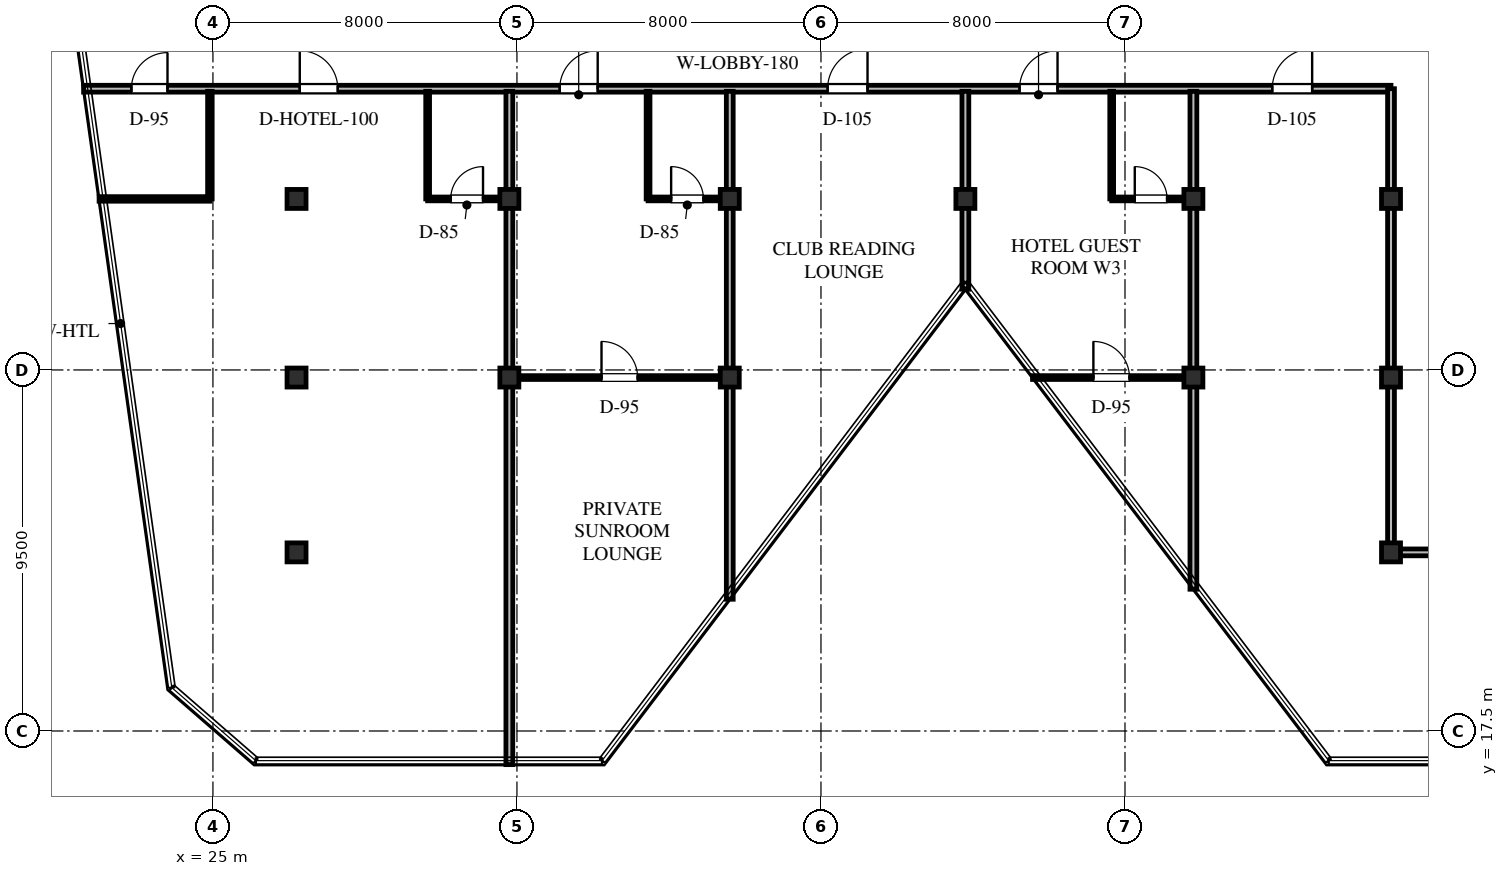
"""IFC4 building model, lengths in metres.
Left out: names, types, materials, properties, quantities, classifications, styles, units other than length and angle.
Written with IfcOpenShell. Run it as: python <this file> out.ifc"""

import sys

from ifc_helpers import new_model, si_unit, direction, frame, frame_2d, origin, origin_2d, place, context, subcontext, project, spatial, rectangle, hollow_rectangle, extrude, element, fill, save


model = new_model("IFC4")
c1 = context("Model", 3, precision=1e-05, world=origin(), true_north=direction((0.0, 1.0)))
c2 = subcontext(c1, "Body", "Model", "MODEL_VIEW")
j1 = project(units=[si_unit("LENGTHUNIT", "METRE"), si_unit("PLANEANGLEUNIT", "RADIAN")], contexts=[c1])
p1 = place(None, origin())
s1 = spatial("IfcSite", under=j1, at=p1, CompositionType="ELEMENT")
p2 = place(p1, origin())
s2 = spatial("IfcBuilding", under=s1, at=p2, CompositionType="ELEMENT")
p3 = place(p2, frame((0.0, 0.0, 241.8)))
s3 = spatial("IfcBuildingStorey", under=s2, at=p3, CompositionType="ELEMENT", Elevation=241.8)
for number, where, z_axis, x_axis in (
    (1, (44.8, 31.5, 0.0), (0.0, 0.0, 1.0), (1.0, 0.0, 0.0)),
    (2, (50.8, 31.5, 0.0), (0.0, 0.0, 1.0), (1.0, 0.0, 0.0)),
    (3, (56.0, 31.5, 0.0), (0.0, 0.0, 1.0), (1.0, 0.0, 0.0)),
    (4, (38.6, 31.5, 0.0), (0.0, 0.0, 1.0), (1.0, 0.0, 0.0)),
    (5, (32.8, 31.5, 0.0), (0.0, 0.0, 1.0), (1.0, 0.0, 0.0)),
    (6, (27.2, 31.5, 0.0), (0.0, 0.0, 1.0), (1.0, 0.0, 0.0)),
    (7, (38.6, 26.8, 0.0), (0.0, 0.0, 1.0), (1.0, 0.0, 0.0)),
    (8, (50.8, 26.8, 0.0), (0.0, 0.0, 1.0), (1.0, 0.0, 0.0)),
    (9, (56.0, 26.8, 0.0), (0.0, 0.0, 1.0), (1.0, 0.0, 0.0)),
    (10, (56.0, 22.2, 0.0), (0.0, 0.0, 1.0), (1.0, 0.0, 0.0)),
    (11, (27.2, 22.2, 0.0), (0.0, 0.0, 1.0), (1.0, 0.0, 0.0)),
    (12, (27.2, 26.8, 0.0), (0.0, 0.0, 1.0), (1.0, 0.0, 0.0)),
    (13, (32.8, 26.8, 0.0), (0.0, 0.0, 1.0), (1.0, 0.0, 0.0)),
):
    element("IfcColumn", number, at=place(p3, frame(where, z_axis=z_axis, x_axis=x_axis)), inside=s3, PredefinedType="COLUMN", context=c2, shape_type="SweptSolid", body=[
        extrude(hollow_rectangle(XDim=0.5, YDim=0.5, WallThickness=0.02, at=origin_2d()), origin(), (0.0, 0.0, 1.0), 3.6),
    ])
p4 = place(p3, frame((21.597, 34.4, 0.0), z_axis=(0.0, 0.0, 1.0), x_axis=(1.0, 0.0, 0.0)))
e14 = element("IfcWall", 14, at=p4, inside=s3, PredefinedType="STANDARD", context=c2, shape_type="SweptSolid", body=[
    extrude(rectangle(XDim=34.403, YDim=0.18, at=frame_2d((17.202, 0.0))), origin(), (0.0, 0.0, 1.0), 2.654),
])
p5 = place(p4, frame((1.258, 0.0, 0.0)))
e15 = element("IfcOpeningElement", 15, at=p5, cuts=e14, PredefinedType="OPENING", context=c2, shape_type="SweptSolid", body=[
    extrude(rectangle(XDim=0.95, YDim=2.15, at=frame_2d((0.475, 1.075))), frame((0.0, 0.1, 0.0), z_axis=(0.0, -1.0, 0.0), x_axis=(1.0, 0.0, 0.0)), (0.0, 0.0, 1.0), 0.2),
])
p6 = place(p4, frame((5.688, 0.0, 0.0)))
e16 = element("IfcOpeningElement", 16, at=p6, cuts=e14, PredefinedType="OPENING", context=c2, shape_type="SweptSolid", body=[
    extrude(rectangle(XDim=1.0, YDim=2.15, at=frame_2d((0.5, 1.075))), frame((0.0, 0.1, 0.0), z_axis=(0.0, -1.0, 0.0), x_axis=(1.0, 0.0, 0.0)), (0.0, 0.0, 1.0), 0.2),
])
p7 = place(p4, frame((12.528, 0.0, 0.0)))
e17 = element("IfcOpeningElement", 17, at=p7, cuts=e14, PredefinedType="OPENING", context=c2, shape_type="SweptSolid", body=[
    extrude(rectangle(XDim=1.0, YDim=2.15, at=frame_2d((0.5, 1.075))), frame((0.0, 0.1, 0.0), z_axis=(0.0, -1.0, 0.0), x_axis=(1.0, 0.0, 0.0)), (0.0, 0.0, 1.0), 0.2),
])
p8 = place(p4, frame((19.578, 0.0, 0.0)))
e18 = element("IfcOpeningElement", 18, at=p8, cuts=e14, PredefinedType="OPENING", context=c2, shape_type="SweptSolid", body=[
    extrude(rectangle(XDim=1.05, YDim=2.2, at=frame_2d((0.525, 1.1))), frame((0.0, 0.1, 0.0), z_axis=(0.0, -1.0, 0.0), x_axis=(1.0, 0.0, 0.0)), (0.0, 0.0, 1.0), 0.2),
])
p9 = place(p4, frame((24.628, 0.0, 0.0)))
e19 = element("IfcOpeningElement", 19, at=p9, cuts=e14, PredefinedType="OPENING", context=c2, shape_type="SweptSolid", body=[
    extrude(rectangle(XDim=1.0, YDim=2.15, at=frame_2d((0.5, 1.075))), frame((0.0, 0.1, 0.0), z_axis=(0.0, -1.0, 0.0), x_axis=(1.0, 0.0, 0.0)), (0.0, 0.0, 1.0), 0.2),
])
p10 = place(p4, frame((31.278, 0.0, 0.0)))
e20 = element("IfcOpeningElement", 20, at=p10, cuts=e14, PredefinedType="OPENING", context=c2, shape_type="SweptSolid", body=[
    extrude(rectangle(XDim=1.05, YDim=2.2, at=frame_2d((0.525, 1.1))), frame((0.0, 0.1, 0.0), z_axis=(0.0, -1.0, 0.0), x_axis=(1.0, 0.0, 0.0)), (0.0, 0.0, 1.0), 0.2),
])
p11 = place(p3, frame((56.0, 22.2, 0.0), z_axis=(0.0, 0.0, 1.0), x_axis=(0.0, 1.0, 0.0)))
e21 = element("IfcWall", 21, at=p11, inside=s3, PredefinedType="STANDARD", context=c2, shape_type="SweptSolid", body=[
    extrude(rectangle(XDim=12.2, YDim=0.18, at=frame_2d((6.1, 0.0))), origin(), (0.0, 0.0, 1.0), 2.654),
])
p12 = place(p3, frame((56.0, 22.2, 0.0), z_axis=(0.0, 0.0, 1.0), x_axis=(1.0, 0.0, 0.0)))
e22 = element("IfcWall", 22, at=p12, inside=s3, PredefinedType="STANDARD", context=c2, shape_type="SweptSolid", body=[
    extrude(rectangle(XDim=2.0, YDim=0.18, at=frame_2d((1.0, 0.0))), origin(), (0.0, 0.0, 1.0), 2.654),
])
p13 = place(p3, frame((24.92, 31.5, 0.0), z_axis=(0.0, 0.0, 1.0), x_axis=(0.0, 1.0, 0.0)))
e23 = element("IfcWall", 23, at=p13, inside=s3, PredefinedType="PARTITIONING", context=c2, shape_type="SweptSolid", body=[
    extrude(rectangle(XDim=2.832, YDim=0.12, at=frame_2d((1.416, 0.0))), origin(), (0.0, 0.0, 1.0), 3.35),
])
p14 = place(p3, frame((22.004, 31.5, 0.0), z_axis=(0.0, 0.0, 1.0), x_axis=(1.0, 0.0, 0.0)))
e24 = element("IfcWall", 24, at=p14, inside=s3, PredefinedType="PARTITIONING", context=c2, shape_type="SweptSolid", body=[
    extrude(rectangle(XDim=2.916, YDim=0.12, at=frame_2d((1.458, 0.0))), origin(), (0.0, 0.0, 1.0), 3.35),
])
p15 = place(p3, frame((30.65, 31.5, 0.0), z_axis=(0.0, 0.0, 1.0), x_axis=(0.0, 1.0, 0.0)))
e25 = element("IfcWall", 25, at=p15, inside=s3, PredefinedType="PARTITIONING", context=c2, shape_type="SweptSolid", body=[
    extrude(rectangle(XDim=2.832, YDim=0.1, at=frame_2d((1.416, 0.0))), origin(), (0.0, 0.0, 1.0), 2.654),
])
p16 = place(p3, frame((30.65, 31.5, 0.0), z_axis=(0.0, 0.0, 1.0), x_axis=(1.0, 0.0, 0.0)))
e26 = element("IfcWall", 26, at=p16, inside=s3, PredefinedType="PARTITIONING", context=c2, shape_type="SweptSolid", body=[
    extrude(rectangle(XDim=2.082, YDim=0.1, at=frame_2d((1.041, 0.0))), origin(), (0.0, 0.0, 1.0), 2.654),
])
p17 = place(p16, frame((0.607, 0.0, 0.0)))
e27 = element("IfcOpeningElement", 27, at=p17, cuts=e26, PredefinedType="OPENING", context=c2, shape_type="SweptSolid", body=[
    extrude(rectangle(XDim=0.85, YDim=2.1, at=frame_2d((0.425, 1.05))), frame((0.0, 0.06, 0.0), z_axis=(0.0, -1.0, 0.0), x_axis=(1.0, 0.0, 0.0)), (0.0, 0.0, 1.0), 0.12),
])
p18 = place(p3, frame((32.8, 16.615, 0.0), z_axis=(0.0, 0.0, 1.0), x_axis=(0.0, 1.0, 0.0)))
e28 = element("IfcWall", 28, at=p18, inside=s3, PredefinedType="STANDARD", context=c2, shape_type="SweptSolid", body=[
    extrude(rectangle(XDim=17.717, YDim=0.18, at=frame_2d((8.858, 0.0))), origin(), (0.0, 0.0, 1.0), 2.654),
])
p19 = place(p3, frame((32.868, 26.8, 0.0), z_axis=(0.0, 0.0, 1.0), x_axis=(1.0, 0.0, 0.0)))
e29 = element("IfcWall", 29, at=p19, inside=s3, PredefinedType="PARTITIONING", context=c2, shape_type="SweptSolid", body=[
    extrude(rectangle(XDim=5.664, YDim=0.1, at=frame_2d((2.832, 0.0))), origin(), (0.0, 0.0, 1.0), 2.654),
])
p20 = place(p19, frame((2.357, 0.0, 0.0)))
e30 = element("IfcOpeningElement", 30, at=p20, cuts=e29, PredefinedType="OPENING", context=c2, shape_type="SweptSolid", body=[
    extrude(rectangle(XDim=0.95, YDim=2.15, at=frame_2d((0.475, 1.075))), frame((0.0, 0.06, 0.0), z_axis=(0.0, -1.0, 0.0), x_axis=(1.0, 0.0, 0.0)), (0.0, 0.0, 1.0), 0.12),
])
p21 = place(p3, frame((36.45, 31.5, 0.0), z_axis=(0.0, 0.0, 1.0), x_axis=(0.0, 1.0, 0.0)))
e31 = element("IfcWall", 31, at=p21, inside=s3, PredefinedType="PARTITIONING", context=c2, shape_type="SweptSolid", body=[
    extrude(rectangle(XDim=2.832, YDim=0.1, at=frame_2d((1.416, 0.0))), origin(), (0.0, 0.0, 1.0), 2.654),
])
p22 = place(p3, frame((36.45, 31.5, 0.0), z_axis=(0.0, 0.0, 1.0), x_axis=(1.0, 0.0, 0.0)))
e32 = element("IfcWall", 32, at=p22, inside=s3, PredefinedType="PARTITIONING", context=c2, shape_type="SweptSolid", body=[
    extrude(rectangle(XDim=2.082, YDim=0.1, at=frame_2d((1.041, 0.0))), origin(), (0.0, 0.0, 1.0), 2.654),
])
p23 = place(p22, frame((0.607, 0.0, 0.0)))
e33 = element("IfcOpeningElement", 33, at=p23, cuts=e32, PredefinedType="OPENING", context=c2, shape_type="SweptSolid", body=[
    extrude(rectangle(XDim=0.85, YDim=2.1, at=frame_2d((0.425, 1.05))), frame((0.0, 0.06, 0.0), z_axis=(0.0, -1.0, 0.0), x_axis=(1.0, 0.0, 0.0)), (0.0, 0.0, 1.0), 0.12),
])
p24 = place(p3, frame((38.6, 20.967, 0.0), z_axis=(0.0, 0.0, 1.0), x_axis=(0.0, 1.0, 0.0)))
e34 = element("IfcWall", 34, at=p24, inside=s3, PredefinedType="STANDARD", context=c2, shape_type="SweptSolid", body=[
    extrude(rectangle(XDim=13.365, YDim=0.18, at=frame_2d((6.683, 0.0))), origin(), (0.0, 0.0, 1.0), 2.654),
])
p25 = place(p3, frame((44.8, 29.125, 0.0), z_axis=(0.0, 0.0, 1.0), x_axis=(0.0, 1.0, 0.0)))
e35 = element("IfcWall", 35, at=p25, inside=s3, PredefinedType="STANDARD", context=c2, shape_type="SweptSolid", body=[
    extrude(rectangle(XDim=5.207, YDim=0.18, at=frame_2d((2.604, 0.0))), origin(), (0.0, 0.0, 1.0), 2.654),
])
p26 = place(p3, frame((46.567, 26.8, 0.0), z_axis=(0.0, 0.0, 1.0), x_axis=(1.0, 0.0, 0.0)))
e36 = element("IfcWall", 36, at=p26, inside=s3, PredefinedType="PARTITIONING", context=c2, shape_type="SweptSolid", body=[
    extrude(rectangle(XDim=4.165, YDim=0.1, at=frame_2d((2.083, 0.0))), origin(), (0.0, 0.0, 1.0), 2.654),
])
p27 = place(p26, frame((1.602, 0.0, 0.0)))
e37 = element("IfcOpeningElement", 37, at=p27, cuts=e36, PredefinedType="OPENING", context=c2, shape_type="SweptSolid", body=[
    extrude(rectangle(XDim=0.95, YDim=2.15, at=frame_2d((0.475, 1.075))), frame((0.0, 0.06, 0.0), z_axis=(0.0, -1.0, 0.0), x_axis=(1.0, 0.0, 0.0)), (0.0, 0.0, 1.0), 0.12),
])
p28 = place(p3, frame((48.65, 31.5, 0.0), z_axis=(0.0, 0.0, 1.0), x_axis=(0.0, 1.0, 0.0)))
e38 = element("IfcWall", 38, at=p28, inside=s3, PredefinedType="PARTITIONING", context=c2, shape_type="SweptSolid", body=[
    extrude(rectangle(XDim=2.832, YDim=0.1, at=frame_2d((1.416, 0.0))), origin(), (0.0, 0.0, 1.0), 2.654),
])
p29 = place(p3, frame((48.65, 31.5, 0.0), z_axis=(0.0, 0.0, 1.0), x_axis=(1.0, 0.0, 0.0)))
e39 = element("IfcWall", 39, at=p29, inside=s3, PredefinedType="PARTITIONING", context=c2, shape_type="SweptSolid", body=[
    extrude(rectangle(XDim=2.082, YDim=0.1, at=frame_2d((1.041, 0.0))), origin(), (0.0, 0.0, 1.0), 2.654),
])
p30 = place(p29, frame((0.607, 0.0, 0.0)))
e40 = element("IfcOpeningElement", 40, at=p30, cuts=e39, PredefinedType="OPENING", context=c2, shape_type="SweptSolid", body=[
    extrude(rectangle(XDim=0.85, YDim=2.1, at=frame_2d((0.425, 1.05))), frame((0.0, 0.06, 0.0), z_axis=(0.0, -1.0, 0.0), x_axis=(1.0, 0.0, 0.0)), (0.0, 0.0, 1.0), 0.12),
])
p31 = place(p3, frame((50.8, 21.23, 0.0), z_axis=(0.0, 0.0, 1.0), x_axis=(0.0, 1.0, 0.0)))
e41 = element("IfcWall", 41, at=p31, inside=s3, PredefinedType="STANDARD", context=c2, shape_type="SweptSolid", body=[
    extrude(rectangle(XDim=13.102, YDim=0.18, at=frame_2d((6.551, 0.0))), origin(), (0.0, 0.0, 1.0), 2.654),
])
p32 = place(p5, origin())
e42 = element("IfcDoor", 42, at=p32, inside=s3, OperationType="SINGLE_SWING_RIGHT", PredefinedType="DOOR", context=c2, shape_type="SweptSolid", body=[
    extrude(rectangle(XDim=0.95, YDim=2.15, at=frame_2d((0.475, 1.075))), frame((0.0, 0.025, 0.0), z_axis=(0.0, -1.0, 0.0), x_axis=(1.0, 0.0, 0.0)), (0.0, 0.0, 1.0), 0.05),
])
fill(e15, e42)
p33 = place(p6, origin())
e43 = element("IfcDoor", 43, at=p33, inside=s3, OperationType="SINGLE_SWING_LEFT", PredefinedType="DOOR", context=c2, shape_type="SweptSolid", body=[
    extrude(rectangle(XDim=1.0, YDim=2.15, at=frame_2d((0.5, 1.075))), frame((0.0, 0.025, 0.0), z_axis=(0.0, -1.0, 0.0), x_axis=(1.0, 0.0, 0.0)), (0.0, 0.0, 1.0), 0.05),
])
fill(e16, e43)
p34 = place(p17, origin())
e44 = element("IfcDoor", 44, at=p34, inside=s3, OperationType="SINGLE_SWING_RIGHT", PredefinedType="DOOR", context=c2, shape_type="SweptSolid", body=[
    extrude(rectangle(XDim=0.85, YDim=2.1, at=frame_2d((0.425, 1.05))), frame((0.0, 0.025, 0.0), z_axis=(0.0, -1.0, 0.0), x_axis=(1.0, 0.0, 0.0)), (0.0, 0.0, 1.0), 0.05),
])
fill(e27, e44)
p35 = place(p20, origin())
e45 = element("IfcDoor", 45, at=p35, inside=s3, OperationType="SINGLE_SWING_LEFT", PredefinedType="DOOR", context=c2, shape_type="SweptSolid", body=[
    extrude(rectangle(XDim=0.95, YDim=2.15, at=frame_2d((0.475, 1.075))), frame((0.0, 0.025, 0.0), z_axis=(0.0, -1.0, 0.0), x_axis=(1.0, 0.0, 0.0)), (0.0, 0.0, 1.0), 0.05),
])
fill(e30, e45)
p36 = place(p7, origin())
e46 = element("IfcDoor", 46, at=p36, inside=s3, OperationType="SINGLE_SWING_RIGHT", PredefinedType="DOOR", context=c2, shape_type="SweptSolid", body=[
    extrude(rectangle(XDim=1.0, YDim=2.15, at=frame_2d((0.5, 1.075))), frame((0.0, 0.025, 0.0), z_axis=(0.0, -1.0, 0.0), x_axis=(1.0, 0.0, 0.0)), (0.0, 0.0, 1.0), 0.05),
])
fill(e17, e46)
p37 = place(p23, origin())
e47 = element("IfcDoor", 47, at=p37, inside=s3, OperationType="SINGLE_SWING_LEFT", PredefinedType="DOOR", context=c2, shape_type="SweptSolid", body=[
    extrude(rectangle(XDim=0.85, YDim=2.1, at=frame_2d((0.425, 1.05))), frame((0.0, 0.025, 0.0), z_axis=(0.0, -1.0, 0.0), x_axis=(1.0, 0.0, 0.0)), (0.0, 0.0, 1.0), 0.05),
])
fill(e33, e47)
p38 = place(p8, origin())
e48 = element("IfcDoor", 48, at=p38, inside=s3, OperationType="SINGLE_SWING_RIGHT", PredefinedType="DOOR", context=c2, shape_type="SweptSolid", body=[
    extrude(rectangle(XDim=1.05, YDim=2.2, at=frame_2d((0.525, 1.1))), frame((0.0, 0.025, 0.0), z_axis=(0.0, -1.0, 0.0), x_axis=(1.0, 0.0, 0.0)), (0.0, 0.0, 1.0), 0.05),
])
fill(e18, e48)
p39 = place(p27, origin())
e49 = element("IfcDoor", 49, at=p39, inside=s3, OperationType="SINGLE_SWING_LEFT", PredefinedType="DOOR", context=c2, shape_type="SweptSolid", body=[
    extrude(rectangle(XDim=0.95, YDim=2.15, at=frame_2d((0.475, 1.075))), frame((0.0, 0.025, 0.0), z_axis=(0.0, -1.0, 0.0), x_axis=(1.0, 0.0, 0.0)), (0.0, 0.0, 1.0), 0.05),
])
fill(e37, e49)
p40 = place(p9, origin())
e50 = element("IfcDoor", 50, at=p40, inside=s3, OperationType="SINGLE_SWING_RIGHT", PredefinedType="DOOR", context=c2, shape_type="SweptSolid", body=[
    extrude(rectangle(XDim=1.0, YDim=2.15, at=frame_2d((0.5, 1.075))), frame((0.0, 0.025, 0.0), z_axis=(0.0, -1.0, 0.0), x_axis=(1.0, 0.0, 0.0)), (0.0, 0.0, 1.0), 0.05),
])
fill(e19, e50)
p41 = place(p30, origin())
e51 = element("IfcDoor", 51, at=p41, inside=s3, OperationType="SINGLE_SWING_LEFT", PredefinedType="DOOR", context=c2, shape_type="SweptSolid", body=[
    extrude(rectangle(XDim=0.85, YDim=2.1, at=frame_2d((0.425, 1.05))), frame((0.0, 0.025, 0.0), z_axis=(0.0, -1.0, 0.0), x_axis=(1.0, 0.0, 0.0)), (0.0, 0.0, 1.0), 0.05),
])
fill(e40, e51)
p42 = place(p10, origin())
e52 = element("IfcDoor", 52, at=p42, inside=s3, OperationType="SINGLE_SWING_RIGHT", PredefinedType="DOOR", context=c2, shape_type="SweptSolid", body=[
    extrude(rectangle(XDim=1.05, YDim=2.2, at=frame_2d((0.525, 1.1))), frame((0.0, 0.025, 0.0), z_axis=(0.0, -1.0, 0.0), x_axis=(1.0, 0.0, 0.0)), (0.0, 0.0, 1.0), 0.05),
])
fill(e20, e52)
save(model, sys.argv[1])
